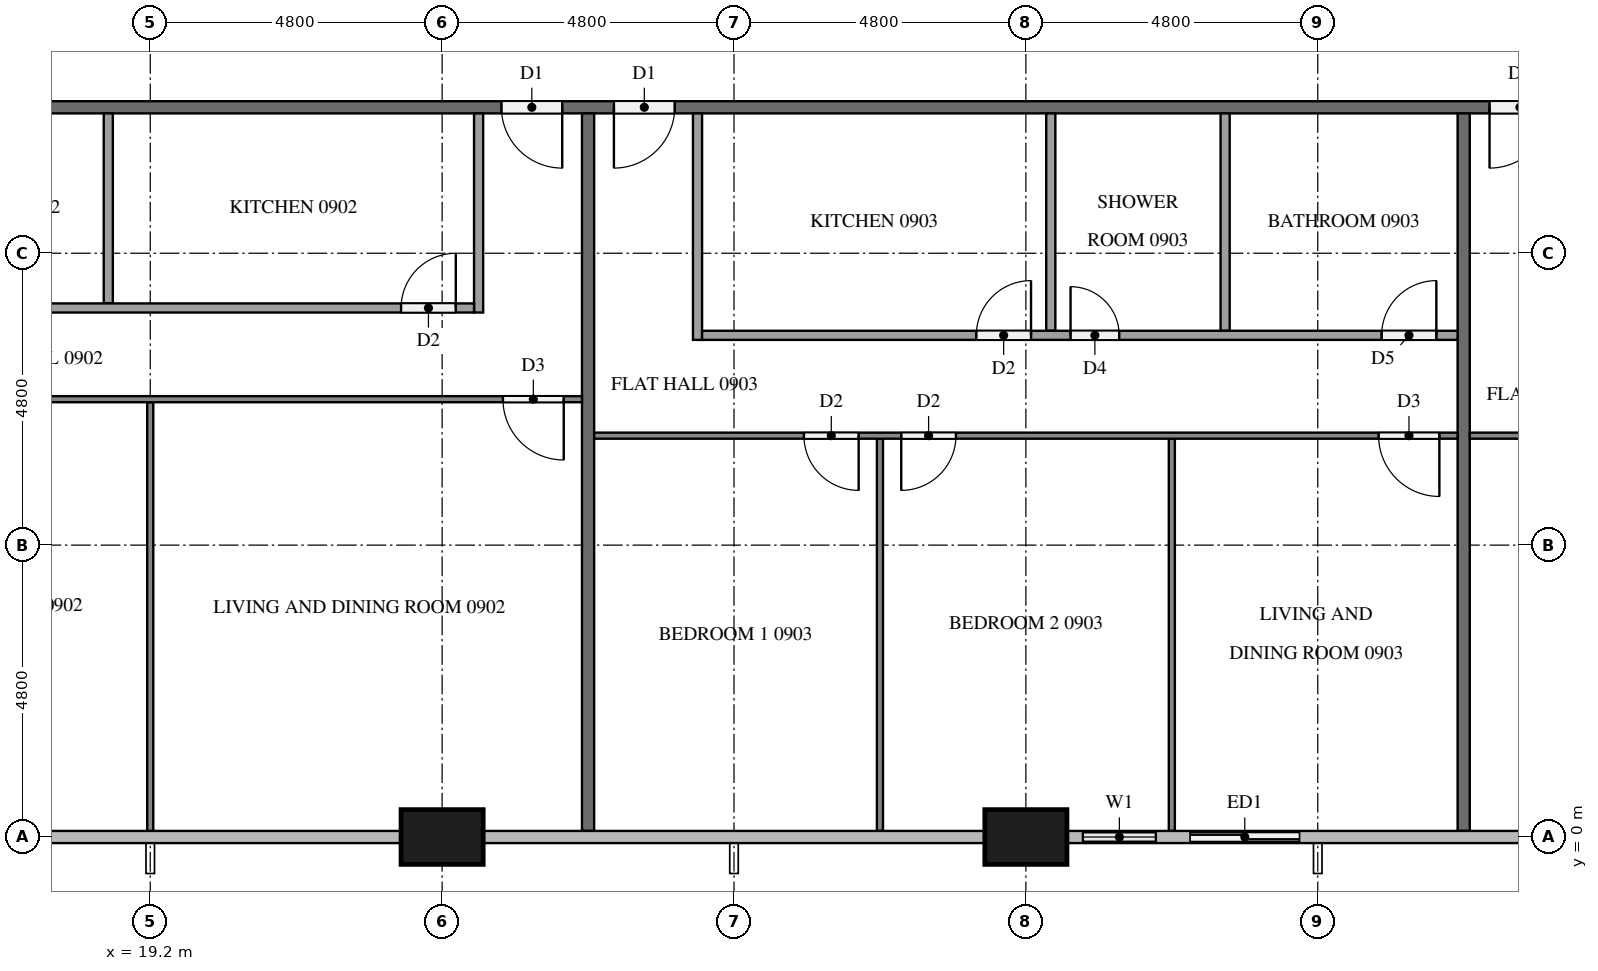
"""IFC4 building model, lengths in metres.
Left out: names, types, materials, properties, quantities, classifications, styles, units other than length and angle.
Written with IfcOpenShell. Run it as: python <this file> out.ifc"""

import sys

from ifc_helpers import new_model, si_unit, direction, frame, frame_2d, origin, origin_2d, place, context, subcontext, project, spatial, rectangle, extrude, element, fill, save


model = new_model("IFC4")
c1 = context("Model", 3, precision=1e-05, world=origin(), true_north=direction((0.0, 1.0)))
c2 = subcontext(c1, "Body", "Model", "MODEL_VIEW")
j1 = project(units=[si_unit("LENGTHUNIT", "METRE"), si_unit("PLANEANGLEUNIT", "RADIAN")], contexts=[c1])
p1 = place(None, origin())
s1 = spatial("IfcSite", under=j1, at=p1, CompositionType="ELEMENT")
p2 = place(p1, origin())
s2 = spatial("IfcBuilding", under=s1, at=p2, CompositionType="ELEMENT")
p3 = place(p2, frame((0.0, 0.0, 39.9)))
s3 = spatial("IfcBuildingStorey", under=s2, at=p3, CompositionType="ELEMENT", Elevation=39.9)
for number, where, z_axis, x_axis in (
    (1, (24.0, 0.0, 0.0), (0.0, 0.0, 1.0), (1.0, 0.0, 0.0)),
    (2, (33.6, 0.0, 0.0), (0.0, 0.0, 1.0), (1.0, 0.0, 0.0)),
):
    element("IfcColumn", number, at=place(p3, frame(where, z_axis=z_axis, x_axis=x_axis)), inside=s3, PredefinedType="COLUMN", context=c2, shape_type="SweptSolid", body=[
        extrude(rectangle(XDim=1.35, YDim=0.9, at=origin_2d()), origin(), (0.0, 0.0, 1.0), 3.2),
    ])
p4 = place(p3, frame((34.275, 0.0, 0.0), z_axis=(0.0, 0.0, 1.0), x_axis=(1.0, 0.0, 0.0)))
e3 = element("IfcWall", 3, at=p4, inside=s3, PredefinedType="SOLIDWALL", context=c2, shape_type="SweptSolid", body=[
    extrude(rectangle(XDim=4.125, YDim=0.15, at=frame_2d((2.062, 0.0))), origin(), (0.0, 0.0, 1.0), 3.2),
])
p5 = place(p4, frame((0.262, 0.0, 0.9)))
e4 = element("IfcOpeningElement", 4, at=p5, cuts=e3, PredefinedType="OPENING", context=c2, shape_type="SweptSolid", body=[
    extrude(rectangle(XDim=1.2, YDim=1.4, at=frame_2d((0.6, 0.7))), frame((0.0, 0.085, 0.0), z_axis=(0.0, -1.0, 0.0), x_axis=(1.0, 0.0, 0.0)), (0.0, 0.0, 1.0), 0.17),
])
p6 = place(p4, frame((2.025, 0.0, 0.0)))
e5 = element("IfcOpeningElement", 5, at=p6, cuts=e3, PredefinedType="OPENING", context=c2, shape_type="SweptSolid", body=[
    extrude(rectangle(XDim=1.8, YDim=2.4, at=frame_2d((0.9, 1.2))), frame((0.0, 0.085, 0.0), z_axis=(0.0, -1.0, 0.0), x_axis=(1.0, 0.0, 0.0)), (0.0, 0.0, 1.0), 0.17),
])
p7 = place(p3, frame((50.5, 12.0, 0.0), z_axis=(0.0, 0.0, 1.0), x_axis=(-1.0, 0.0, 0.0)))
e6 = element("IfcWall", 6, at=p7, inside=s3, PredefinedType="PARTITIONING", context=c2, shape_type="SweptSolid", body=[
    extrude(rectangle(XDim=38.6, YDim=0.2, at=frame_2d((19.3, 0.0))), origin(), (0.0, 0.0, 1.0), 3.2),
])
p8 = place(p7, frame((36.525, 0.0, 0.0)))
e7 = element("IfcOpeningElement", 7, at=p8, cuts=e6, PredefinedType="OPENING", context=c2, shape_type="SweptSolid", body=[
    extrude(rectangle(XDim=1.0, YDim=2.1, at=frame_2d((0.5, 1.05))), frame((0.0, 0.11, 0.0), z_axis=(0.0, -1.0, 0.0), x_axis=(1.0, 0.0, 0.0)), (0.0, 0.0, 1.0), 0.22),
])
p9 = place(p7, frame((24.525, 0.0, 0.0)))
e8 = element("IfcOpeningElement", 8, at=p9, cuts=e6, PredefinedType="OPENING", context=c2, shape_type="SweptSolid", body=[
    extrude(rectangle(XDim=1.0, YDim=2.1, at=frame_2d((0.5, 1.05))), frame((0.0, 0.11, 0.0), z_axis=(0.0, -1.0, 0.0), x_axis=(1.0, 0.0, 0.0)), (0.0, 0.0, 1.0), 0.22),
])
p10 = place(p7, frame((22.675, 0.0, 0.0)))
e9 = element("IfcOpeningElement", 9, at=p10, cuts=e6, PredefinedType="OPENING", context=c2, shape_type="SweptSolid", body=[
    extrude(rectangle(XDim=1.0, YDim=2.1, at=frame_2d((0.5, 1.05))), frame((0.0, 0.11, 0.0), z_axis=(0.0, -1.0, 0.0), x_axis=(1.0, 0.0, 0.0)), (0.0, 0.0, 1.0), 0.22),
])
p11 = place(p7, frame((8.275, 0.0, 0.0)))
e10 = element("IfcOpeningElement", 10, at=p11, cuts=e6, PredefinedType="OPENING", context=c2, shape_type="SweptSolid", body=[
    extrude(rectangle(XDim=1.0, YDim=2.1, at=frame_2d((0.5, 1.05))), frame((0.0, 0.11, 0.0), z_axis=(0.0, -1.0, 0.0), x_axis=(1.0, 0.0, 0.0)), (0.0, 0.0, 1.0), 0.22),
])
for number, where, z_axis, x_axis in (
    (11, (26.4, 11.9, 0.0), (0.0, 0.0, 1.0), (0.0, -1.0, 0.0)),
    (12, (40.8, 11.9, 0.0), (0.0, 0.0, 1.0), (0.0, -1.0, 0.0)),
):
    element("IfcWall", number, at=place(p3, frame(where, z_axis=z_axis, x_axis=x_axis)), inside=s3, PredefinedType="PARTITIONING", context=c2, shape_type="SweptSolid", body=[
        extrude(rectangle(XDim=11.8, YDim=0.2, at=frame_2d((5.9, 0.0))), origin(), (0.0, 0.0, 1.0), 3.2),
    ])
p12 = place(p3, frame((19.2, 7.15, 0.0), z_axis=(0.0, 0.0, 1.0), x_axis=(0.0, -1.0, 0.0)))
e13 = element("IfcWall", 13, at=p12, inside=s3, PredefinedType="PARTITIONING", context=c2, shape_type="SweptSolid", body=[
    extrude(rectangle(XDim=7.05, YDim=0.1, at=frame_2d((3.525, 0.0))), origin(), (0.0, 0.0, 1.0), 3.2),
])
p13 = place(p3, frame((26.3, 7.2, 0.0), z_axis=(0.0, 0.0, 1.0), x_axis=(-1.0, 0.0, 0.0)))
e14 = element("IfcWall", 14, at=p13, inside=s3, PredefinedType="PARTITIONING", context=c2, shape_type="SweptSolid", body=[
    extrude(rectangle(XDim=11.8, YDim=0.1, at=frame_2d((5.9, 0.0))), origin(), (0.0, 0.0, 1.0), 3.2),
])
p14 = place(p13, frame((0.3, 0.0, 0.0)))
e15 = element("IfcOpeningElement", 15, at=p14, cuts=e14, PredefinedType="OPENING", context=c2, shape_type="SweptSolid", body=[
    extrude(rectangle(XDim=1.0, YDim=2.1, at=frame_2d((0.5, 1.05))), frame((0.0, 0.06, 0.0), z_axis=(0.0, -1.0, 0.0), x_axis=(1.0, 0.0, 0.0)), (0.0, 0.0, 1.0), 0.12),
])
p15 = place(p13, frame((10.6, 0.0, 0.0)))
e16 = element("IfcOpeningElement", 16, at=p15, cuts=e14, PredefinedType="OPENING", context=c2, shape_type="SweptSolid", body=[
    extrude(rectangle(XDim=0.9, YDim=2.1, at=frame_2d((0.45, 1.05))), frame((0.0, 0.06, 0.0), z_axis=(0.0, -1.0, 0.0), x_axis=(1.0, 0.0, 0.0)), (0.0, 0.0, 1.0), 0.12),
])
p16 = place(p3, frame((18.51, 11.9, 0.0), z_axis=(0.0, 0.0, 1.0), x_axis=(0.0, -1.0, 0.0)))
e17 = element("IfcWall", 17, at=p16, inside=s3, PredefinedType="PARTITIONING", context=c2, shape_type="SweptSolid", body=[
    extrude(rectangle(XDim=3.125, YDim=0.15, at=frame_2d((1.562, 0.0))), origin(), (0.0, 0.0, 1.0), 3.2),
])
p17 = place(p3, frame((24.6, 11.9, 0.0), z_axis=(0.0, 0.0, 1.0), x_axis=(0.0, -1.0, 0.0)))
e18 = element("IfcWall", 18, at=p17, inside=s3, PredefinedType="PARTITIONING", context=c2, shape_type="SweptSolid", body=[
    extrude(rectangle(XDim=3.275, YDim=0.15, at=frame_2d((1.637, 0.0))), origin(), (0.0, 0.0, 1.0), 3.2),
])
p18 = place(p3, frame((14.5, 8.7, 0.0), z_axis=(0.0, 0.0, 1.0), x_axis=(1.0, 0.0, 0.0)))
e19 = element("IfcWall", 19, at=p18, inside=s3, PredefinedType="PARTITIONING", context=c2, shape_type="SweptSolid", body=[
    extrude(rectangle(XDim=10.025, YDim=0.15, at=frame_2d((5.012, 0.0))), origin(), (0.0, 0.0, 1.0), 3.2),
])
p19 = place(p18, frame((8.825, 0.0, 0.0)))
e20 = element("IfcOpeningElement", 20, at=p19, cuts=e19, PredefinedType="OPENING", context=c2, shape_type="SweptSolid", body=[
    extrude(rectangle(XDim=0.9, YDim=2.1, at=frame_2d((0.45, 1.05))), frame((0.0, 0.085, 0.0), z_axis=(0.0, -1.0, 0.0), x_axis=(1.0, 0.0, 0.0)), (0.0, 0.0, 1.0), 0.17),
])
p20 = place(p18, frame((0.35, 0.0, 0.0)))
e21 = element("IfcOpeningElement", 21, at=p20, cuts=e19, PredefinedType="OPENING", context=c2, shape_type="SweptSolid", body=[
    extrude(rectangle(XDim=0.8, YDim=2.1, at=frame_2d((0.4, 1.05))), frame((0.0, 0.085, 0.0), z_axis=(0.0, -1.0, 0.0), x_axis=(1.0, 0.0, 0.0)), (0.0, 0.0, 1.0), 0.17),
])
for number, where, z_axis, x_axis in (
    (22, (31.2, 6.55, 0.0), (0.0, 0.0, 1.0), (0.0, -1.0, 0.0)),
    (23, (36.0, 6.55, 0.0), (0.0, 0.0, 1.0), (0.0, -1.0, 0.0)),
):
    element("IfcWall", number, at=place(p3, frame(where, z_axis=z_axis, x_axis=x_axis)), inside=s3, PredefinedType="PARTITIONING", context=c2, shape_type="SweptSolid", body=[
        extrude(rectangle(XDim=6.45, YDim=0.1, at=frame_2d((3.225, 0.0))), origin(), (0.0, 0.0, 1.0), 3.2),
    ])
p21 = place(p3, frame((40.7, 6.6, 0.0), z_axis=(0.0, 0.0, 1.0), x_axis=(-1.0, 0.0, 0.0)))
e24 = element("IfcWall", 24, at=p21, inside=s3, PredefinedType="PARTITIONING", context=c2, shape_type="SweptSolid", body=[
    extrude(rectangle(XDim=14.2, YDim=0.1, at=frame_2d((7.1, 0.0))), origin(), (0.0, 0.0, 1.0), 3.2),
])
p22 = place(p21, frame((9.85, 0.0, 0.0)))
e25 = element("IfcOpeningElement", 25, at=p22, cuts=e24, PredefinedType="OPENING", context=c2, shape_type="SweptSolid", body=[
    extrude(rectangle(XDim=0.9, YDim=2.1, at=frame_2d((0.45, 1.05))), frame((0.0, 0.06, 0.0), z_axis=(0.0, -1.0, 0.0), x_axis=(1.0, 0.0, 0.0)), (0.0, 0.0, 1.0), 0.12),
])
p23 = place(p21, frame((8.25, 0.0, 0.0)))
e26 = element("IfcOpeningElement", 26, at=p23, cuts=e24, PredefinedType="OPENING", context=c2, shape_type="SweptSolid", body=[
    extrude(rectangle(XDim=0.9, YDim=2.1, at=frame_2d((0.45, 1.05))), frame((0.0, 0.06, 0.0), z_axis=(0.0, -1.0, 0.0), x_axis=(1.0, 0.0, 0.0)), (0.0, 0.0, 1.0), 0.12),
])
p24 = place(p21, frame((0.3, 0.0, 0.0)))
e27 = element("IfcOpeningElement", 27, at=p24, cuts=e24, PredefinedType="OPENING", context=c2, shape_type="SweptSolid", body=[
    extrude(rectangle(XDim=1.0, YDim=2.1, at=frame_2d((0.5, 1.05))), frame((0.0, 0.06, 0.0), z_axis=(0.0, -1.0, 0.0), x_axis=(1.0, 0.0, 0.0)), (0.0, 0.0, 1.0), 0.12),
])
for number, where, z_axis, x_axis in (
    (28, (34.01, 11.9, 0.0), (0.0, 0.0, 1.0), (0.0, -1.0, 0.0)),
    (29, (36.877, 11.9, 0.0), (0.0, 0.0, 1.0), (0.0, -1.0, 0.0)),
):
    element("IfcWall", number, at=place(p3, frame(where, z_axis=z_axis, x_axis=x_axis)), inside=s3, PredefinedType="PARTITIONING", context=c2, shape_type="SweptSolid", body=[
        extrude(rectangle(XDim=3.575, YDim=0.15, at=frame_2d((1.788, 0.0))), origin(), (0.0, 0.0, 1.0), 3.2),
    ])
p25 = place(p3, frame((28.2, 11.9, 0.0), z_axis=(0.0, 0.0, 1.0), x_axis=(0.0, -1.0, 0.0)))
e30 = element("IfcWall", 30, at=p25, inside=s3, PredefinedType="PARTITIONING", context=c2, shape_type="SweptSolid", body=[
    extrude(rectangle(XDim=3.725, YDim=0.15, at=frame_2d((1.862, 0.0))), origin(), (0.0, 0.0, 1.0), 3.2),
])
p26 = place(p3, frame((28.275, 8.25, 0.0), z_axis=(0.0, 0.0, 1.0), x_axis=(1.0, 0.0, 0.0)))
e31 = element("IfcWall", 31, at=p26, inside=s3, PredefinedType="PARTITIONING", context=c2, shape_type="SweptSolid", body=[
    extrude(rectangle(XDim=12.425, YDim=0.15, at=frame_2d((6.212, 0.0))), origin(), (0.0, 0.0, 1.0), 3.2),
])
p27 = place(p26, frame((4.51, 0.0, 0.0)))
e32 = element("IfcOpeningElement", 32, at=p27, cuts=e31, PredefinedType="OPENING", context=c2, shape_type="SweptSolid", body=[
    extrude(rectangle(XDim=0.9, YDim=2.1, at=frame_2d((0.45, 1.05))), frame((0.0, 0.085, 0.0), z_axis=(0.0, -1.0, 0.0), x_axis=(1.0, 0.0, 0.0)), (0.0, 0.0, 1.0), 0.17),
])
p28 = place(p26, frame((6.06, 0.0, 0.0)))
e33 = element("IfcOpeningElement", 33, at=p28, cuts=e31, PredefinedType="OPENING", context=c2, shape_type="SweptSolid", body=[
    extrude(rectangle(XDim=0.8, YDim=2.1, at=frame_2d((0.4, 1.05))), frame((0.0, 0.085, 0.0), z_axis=(0.0, -1.0, 0.0), x_axis=(1.0, 0.0, 0.0)), (0.0, 0.0, 1.0), 0.17),
])
p29 = place(p26, frame((11.175, 0.0, 0.0)))
e34 = element("IfcOpeningElement", 34, at=p29, cuts=e31, PredefinedType="OPENING", context=c2, shape_type="SweptSolid", body=[
    extrude(rectangle(XDim=0.9, YDim=2.1, at=frame_2d((0.45, 1.05))), frame((0.0, 0.085, 0.0), z_axis=(0.0, -1.0, 0.0), x_axis=(1.0, 0.0, 0.0)), (0.0, 0.0, 1.0), 0.17),
])
p30 = place(p3, frame((57.5, 6.6, 0.0), z_axis=(0.0, 0.0, 1.0), x_axis=(-1.0, 0.0, 0.0)))
e35 = element("IfcWall", 35, at=p30, inside=s3, PredefinedType="PARTITIONING", context=c2, shape_type="SweptSolid", body=[
    extrude(rectangle(XDim=16.6, YDim=0.1, at=frame_2d((8.3, 0.0))), origin(), (0.0, 0.0, 1.0), 3.2),
])
p31 = place(p30, frame((9.85, 0.0, 0.0)))
e36 = element("IfcOpeningElement", 36, at=p31, cuts=e35, PredefinedType="OPENING", context=c2, shape_type="SweptSolid", body=[
    extrude(rectangle(XDim=1.0, YDim=2.1, at=frame_2d((0.5, 1.05))), frame((0.0, 0.06, 0.0), z_axis=(0.0, -1.0, 0.0), x_axis=(1.0, 0.0, 0.0)), (0.0, 0.0, 1.0), 0.12),
])
p32 = place(p30, frame((8.25, 0.0, 0.0)))
e37 = element("IfcOpeningElement", 37, at=p32, cuts=e35, PredefinedType="OPENING", context=c2, shape_type="SweptSolid", body=[
    extrude(rectangle(XDim=0.9, YDim=2.1, at=frame_2d((0.45, 1.05))), frame((0.0, 0.06, 0.0), z_axis=(0.0, -1.0, 0.0), x_axis=(1.0, 0.0, 0.0)), (0.0, 0.0, 1.0), 0.12),
])
p33 = place(p30, frame((0.6, 0.0, 0.0)))
e38 = element("IfcOpeningElement", 38, at=p33, cuts=e35, PredefinedType="OPENING", context=c2, shape_type="SweptSolid", body=[
    extrude(rectangle(XDim=0.9, YDim=2.1, at=frame_2d((0.45, 1.05))), frame((0.0, 0.06, 0.0), z_axis=(0.0, -1.0, 0.0), x_axis=(1.0, 0.0, 0.0)), (0.0, 0.0, 1.0), 0.12),
])
p34 = place(p5, origin())
e39 = element("IfcWindow", 39, at=p34, inside=s3, PartitioningType="SINGLE_PANEL", PredefinedType="WINDOW", context=c2, shape_type="SweptSolid", body=[
    extrude(rectangle(XDim=1.2, YDim=1.4, at=frame_2d((0.6, 0.7))), frame((0.0, 0.03, 0.0), z_axis=(0.0, -1.0, 0.0), x_axis=(1.0, 0.0, 0.0)), (0.0, 0.0, 1.0), 0.06),
])
fill(e4, e39)
p35 = place(p6, origin())
e40 = element("IfcDoor", 40, at=p35, inside=s3, OperationType="SLIDING_TO_RIGHT", PredefinedType="DOOR", context=c2, shape_type="SweptSolid", body=[
    extrude(rectangle(XDim=1.8, YDim=2.4, at=frame_2d((0.9, 1.2))), frame((0.0, 0.025, 0.0), z_axis=(0.0, -1.0, 0.0), x_axis=(1.0, 0.0, 0.0)), (0.0, 0.0, 1.0), 0.05),
])
fill(e5, e40)
p36 = place(p9, origin())
e41 = element("IfcDoor", 41, at=p36, inside=s3, OperationType="SINGLE_SWING_LEFT", PredefinedType="DOOR", context=c2, shape_type="SweptSolid", body=[
    extrude(rectangle(XDim=1.0, YDim=2.1, at=frame_2d((0.5, 1.05))), frame((0.0, 0.025, 0.0), z_axis=(0.0, -1.0, 0.0), x_axis=(1.0, 0.0, 0.0)), (0.0, 0.0, 1.0), 0.05),
])
fill(e8, e41)
p37 = place(p10, origin())
e42 = element("IfcDoor", 42, at=p37, inside=s3, OperationType="SINGLE_SWING_RIGHT", PredefinedType="DOOR", context=c2, shape_type="SweptSolid", body=[
    extrude(rectangle(XDim=1.0, YDim=2.1, at=frame_2d((0.5, 1.05))), frame((0.0, 0.025, 0.0), z_axis=(0.0, -1.0, 0.0), x_axis=(1.0, 0.0, 0.0)), (0.0, 0.0, 1.0), 0.05),
])
fill(e9, e42)
p38 = place(p11, origin())
e43 = element("IfcDoor", 43, at=p38, inside=s3, OperationType="SINGLE_SWING_RIGHT", PredefinedType="DOOR", context=c2, shape_type="SweptSolid", body=[
    extrude(rectangle(XDim=1.0, YDim=2.1, at=frame_2d((0.5, 1.05))), frame((0.0, 0.025, 0.0), z_axis=(0.0, -1.0, 0.0), x_axis=(1.0, 0.0, 0.0)), (0.0, 0.0, 1.0), 0.05),
])
fill(e10, e43)
p39 = place(p14, origin())
e44 = element("IfcDoor", 44, at=p39, inside=s3, OperationType="SINGLE_SWING_LEFT", PredefinedType="DOOR", context=c2, shape_type="SweptSolid", body=[
    extrude(rectangle(XDim=1.0, YDim=2.1, at=frame_2d((0.5, 1.05))), frame((0.0, 0.025, 0.0), z_axis=(0.0, -1.0, 0.0), x_axis=(1.0, 0.0, 0.0)), (0.0, 0.0, 1.0), 0.05),
])
fill(e15, e44)
p40 = place(p19, origin())
e45 = element("IfcDoor", 45, at=p40, inside=s3, OperationType="SINGLE_SWING_RIGHT", PredefinedType="DOOR", context=c2, shape_type="SweptSolid", body=[
    extrude(rectangle(XDim=0.9, YDim=2.1, at=frame_2d((0.45, 1.05))), frame((0.0, 0.025, 0.0), z_axis=(0.0, -1.0, 0.0), x_axis=(1.0, 0.0, 0.0)), (0.0, 0.0, 1.0), 0.05),
])
fill(e20, e45)
p41 = place(p22, origin())
e46 = element("IfcDoor", 46, at=p41, inside=s3, OperationType="SINGLE_SWING_LEFT", PredefinedType="DOOR", context=c2, shape_type="SweptSolid", body=[
    extrude(rectangle(XDim=0.9, YDim=2.1, at=frame_2d((0.45, 1.05))), frame((0.0, 0.025, 0.0), z_axis=(0.0, -1.0, 0.0), x_axis=(1.0, 0.0, 0.0)), (0.0, 0.0, 1.0), 0.05),
])
fill(e25, e46)
p42 = place(p23, origin())
e47 = element("IfcDoor", 47, at=p42, inside=s3, OperationType="SINGLE_SWING_RIGHT", PredefinedType="DOOR", context=c2, shape_type="SweptSolid", body=[
    extrude(rectangle(XDim=0.9, YDim=2.1, at=frame_2d((0.45, 1.05))), frame((0.0, 0.025, 0.0), z_axis=(0.0, -1.0, 0.0), x_axis=(1.0, 0.0, 0.0)), (0.0, 0.0, 1.0), 0.05),
])
fill(e26, e47)
p43 = place(p24, origin())
e48 = element("IfcDoor", 48, at=p43, inside=s3, OperationType="SINGLE_SWING_LEFT", PredefinedType="DOOR", context=c2, shape_type="SweptSolid", body=[
    extrude(rectangle(XDim=1.0, YDim=2.1, at=frame_2d((0.5, 1.05))), frame((0.0, 0.025, 0.0), z_axis=(0.0, -1.0, 0.0), x_axis=(1.0, 0.0, 0.0)), (0.0, 0.0, 1.0), 0.05),
])
fill(e27, e48)
p44 = place(p27, origin())
e49 = element("IfcDoor", 49, at=p44, inside=s3, OperationType="SINGLE_SWING_RIGHT", PredefinedType="DOOR", context=c2, shape_type="SweptSolid", body=[
    extrude(rectangle(XDim=0.9, YDim=2.1, at=frame_2d((0.45, 1.05))), frame((0.0, 0.025, 0.0), z_axis=(0.0, -1.0, 0.0), x_axis=(1.0, 0.0, 0.0)), (0.0, 0.0, 1.0), 0.05),
])
fill(e32, e49)
p45 = place(p28, origin())
e50 = element("IfcDoor", 50, at=p45, inside=s3, OperationType="SINGLE_SWING_LEFT", PredefinedType="DOOR", context=c2, shape_type="SweptSolid", body=[
    extrude(rectangle(XDim=0.8, YDim=2.1, at=frame_2d((0.4, 1.05))), frame((0.0, 0.025, 0.0), z_axis=(0.0, -1.0, 0.0), x_axis=(1.0, 0.0, 0.0)), (0.0, 0.0, 1.0), 0.05),
])
fill(e33, e50)
p46 = place(p29, origin())
e51 = element("IfcDoor", 51, at=p46, inside=s3, OperationType="SINGLE_SWING_RIGHT", PredefinedType="DOOR", context=c2, shape_type="SweptSolid", body=[
    extrude(rectangle(XDim=0.9, YDim=2.1, at=frame_2d((0.45, 1.05))), frame((0.0, 0.025, 0.0), z_axis=(0.0, -1.0, 0.0), x_axis=(1.0, 0.0, 0.0)), (0.0, 0.0, 1.0), 0.05),
])
fill(e34, e51)
save(model, sys.argv[1])
